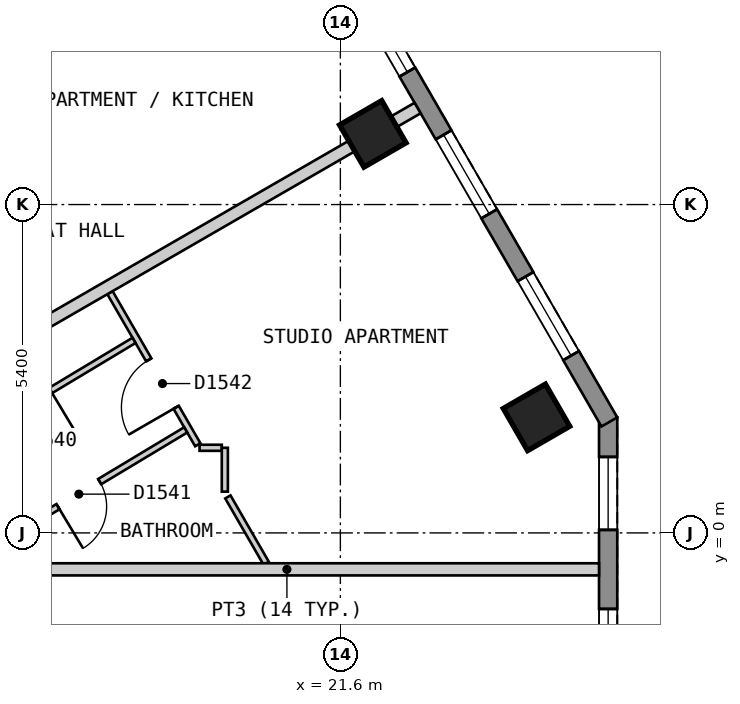
"""IFC4 building model, lengths in metres.
Left out: names, types, materials, properties, quantities, classifications, styles, units other than length and angle.
Written with IfcOpenShell. Run it as: python <this file> out.ifc"""

import sys

from ifc_helpers import new_model, si_unit, direction, frame, frame_2d, origin, origin_2d, place, context, subcontext, project, spatial, polyline, rectangle, outline, extrude, element, fill, save


model = new_model("IFC4")
c1 = context("Model", 3, precision=1e-05, world=origin(), true_north=direction((0.0, 1.0)))
c2 = subcontext(c1, "Body", "Model", "MODEL_VIEW")
j1 = project(units=[si_unit("LENGTHUNIT", "METRE"), si_unit("PLANEANGLEUNIT", "RADIAN")], contexts=[c1])
p1 = place(None, origin())
s1 = spatial("IfcSite", under=j1, at=p1, CompositionType="ELEMENT")
p2 = place(p1, origin())
s2 = spatial("IfcBuilding", under=s1, at=p2, CompositionType="ELEMENT")
p3 = place(p2, frame((0.0, 0.0, 196.2)))
s3 = spatial("IfcBuildingStorey", under=s2, at=p3, CompositionType="ELEMENT", Elevation=196.2)
for number, where, z_axis, x_axis in (
    (1, (24.826, 1.9, 0.0), (0.0, 0.0, 1.0), (-0.5, 0.866, 0.0)),
    (2, (22.134, 6.562, 0.0), (0.0, 0.0, 1.0), (-0.5, 0.866, 0.0)),
):
    element("IfcColumn", number, at=place(p3, frame(where, z_axis=z_axis, x_axis=x_axis)), inside=s3, PredefinedType="COLUMN", context=c2, shape_type="SweptSolid", body=[
        extrude(rectangle(XDim=0.8, YDim=0.8, at=origin_2d()), origin(), (0.0, 0.0, 1.0), 3.0),
    ])
p4 = place(p3, frame((26.004, -3.1, 0.0), z_axis=(0.0, 0.0, 1.0), x_axis=(0.0, 1.0, 0.0)))
e3 = element("IfcWall", 3, at=p4, inside=s3, PredefinedType="SOLIDWALL", context=c2, shape_type="SweptSolid", body=[
    extrude(outline(polyline([(0.0, -0.15), (5.0, -0.15), (4.92, 0.15), (0.08, 0.15), (0.0, -0.15)])), origin(), (0.0, 0.0, 1.0), 2.6),
])
p5 = place(p4, frame((0.65, 0.0, 0.15)))
e4 = element("IfcOpeningElement", 4, at=p5, cuts=e3, PredefinedType="OPENING", context=c2, shape_type="SweptSolid", body=[
    extrude(rectangle(XDim=1.2, YDim=2.1, at=frame_2d((0.6, 1.05))), frame((0.0, 0.16, 0.0), z_axis=(0.0, -1.0, 0.0), x_axis=(1.0, 0.0, 0.0)), (0.0, 0.0, 1.0), 0.32),
])
p6 = place(p4, frame((3.15, 0.0, 0.15)))
e5 = element("IfcOpeningElement", 5, at=p6, cuts=e3, PredefinedType="OPENING", context=c2, shape_type="SweptSolid", body=[
    extrude(rectangle(XDim=1.2, YDim=2.1, at=frame_2d((0.6, 1.05))), frame((0.0, 0.16, 0.0), z_axis=(0.0, -1.0, 0.0), x_axis=(1.0, 0.0, 0.0)), (0.0, 0.0, 1.0), 0.32),
])
p7 = place(p3, frame((26.024, 1.825, 0.0), z_axis=(0.0, 0.0, 1.0), x_axis=(-0.500010537973, 0.866019319597, 0.0)))
e6 = element("IfcWall", 6, at=p7, inside=s3, PredefinedType="SOLIDWALL", context=c2, shape_type="SweptSolid", body=[
    extrude(outline(polyline([(0.0, -0.15), (22.863, -0.15), (22.783, 0.15), (0.08, 0.15), (0.0, -0.15)])), origin(), (0.0, 0.0, 1.0), 2.6),
])
p8 = place(p7, frame((1.259, 0.0, 0.15)))
e7 = element("IfcOpeningElement", 7, at=p8, cuts=e6, PredefinedType="OPENING", context=c2, shape_type="SweptSolid", body=[
    extrude(rectangle(XDim=1.5, YDim=2.1, at=frame_2d((0.75, 1.05))), frame((0.0, 0.16, 0.0), z_axis=(0.0, -1.0, 0.0), x_axis=(1.0, 0.0, 0.0)), (0.0, 0.0, 1.0), 0.32),
])
p9 = place(p7, frame((3.952, 0.0, 0.15)))
e8 = element("IfcOpeningElement", 8, at=p9, cuts=e6, PredefinedType="OPENING", context=c2, shape_type="SweptSolid", body=[
    extrude(rectangle(XDim=1.5, YDim=2.1, at=frame_2d((0.75, 1.05))), frame((0.0, 0.16, 0.0), z_axis=(0.0, -1.0, 0.0), x_axis=(1.0, 0.0, 0.0)), (0.0, 0.0, 1.0), 0.32),
])
p10 = place(p7, frame((6.644, 0.0, 0.15)))
e9 = element("IfcOpeningElement", 9, at=p10, cuts=e6, PredefinedType="OPENING", context=c2, shape_type="SweptSolid", body=[
    extrude(rectangle(XDim=1.5, YDim=2.1, at=frame_2d((0.75, 1.05))), frame((0.0, 0.16, 0.0), z_axis=(0.0, -1.0, 0.0), x_axis=(1.0, 0.0, 0.0)), (0.0, 0.0, 1.0), 0.32),
])
p11 = place(p7, frame((9.335, 0.0, 0.15)))
e10 = element("IfcOpeningElement", 10, at=p11, cuts=e6, PredefinedType="OPENING", context=c2, shape_type="SweptSolid", body=[
    extrude(rectangle(XDim=1.5, YDim=2.1, at=frame_2d((0.75, 1.05))), frame((0.0, 0.16, 0.0), z_axis=(0.0, -1.0, 0.0), x_axis=(1.0, 0.0, 0.0)), (0.0, 0.0, 1.0), 0.32),
])
p12 = place(p7, frame((12.028, 0.0, 0.15)))
e11 = element("IfcOpeningElement", 11, at=p12, cuts=e6, PredefinedType="OPENING", context=c2, shape_type="SweptSolid", body=[
    extrude(rectangle(XDim=1.5, YDim=2.1, at=frame_2d((0.75, 1.05))), frame((0.0, 0.16, 0.0), z_axis=(0.0, -1.0, 0.0), x_axis=(1.0, 0.0, 0.0)), (0.0, 0.0, 1.0), 0.32),
])
p13 = place(p7, frame((14.72, 0.0, 0.15)))
e12 = element("IfcOpeningElement", 12, at=p13, cuts=e6, PredefinedType="OPENING", context=c2, shape_type="SweptSolid", body=[
    extrude(rectangle(XDim=1.5, YDim=2.1, at=frame_2d((0.75, 1.05))), frame((0.0, 0.16, 0.0), z_axis=(0.0, -1.0, 0.0), x_axis=(1.0, 0.0, 0.0)), (0.0, 0.0, 1.0), 0.32),
])
p14 = place(p7, frame((17.411, 0.0, 0.15)))
e13 = element("IfcOpeningElement", 13, at=p14, cuts=e6, PredefinedType="OPENING", context=c2, shape_type="SweptSolid", body=[
    extrude(rectangle(XDim=1.5, YDim=2.1, at=frame_2d((0.75, 1.05))), frame((0.0, 0.16, 0.0), z_axis=(0.0, -1.0, 0.0), x_axis=(1.0, 0.0, 0.0)), (0.0, 0.0, 1.0), 0.32),
])
p15 = place(p7, frame((20.104, 0.0, 0.15)))
e14 = element("IfcOpeningElement", 14, at=p15, cuts=e6, PredefinedType="OPENING", context=c2, shape_type="SweptSolid", body=[
    extrude(rectangle(XDim=1.5, YDim=2.1, at=frame_2d((0.75, 1.05))), frame((0.0, 0.16, 0.0), z_axis=(0.0, -1.0, 0.0), x_axis=(1.0, 0.0, 0.0)), (0.0, 0.0, 1.0), 0.32),
])
p16 = place(p3, frame((17.811, 3.951, 0.0), z_axis=(0.0, 0.0, 1.0), x_axis=(0.499976149225, -0.866039173598, 0.0)))
e15 = element("IfcWall", 15, at=p16, inside=s3, PredefinedType="PARTITIONING", context=c2, shape_type="SweptSolid", body=[
    extrude(rectangle(XDim=2.888, YDim=0.1, at=frame_2d((1.444, 0.0))), origin(), (0.0, 0.0, 1.0), 2.6),
])
p17 = place(p16, frame((1.276, 0.0, 0.0)))
e16 = element("IfcOpeningElement", 16, at=p17, cuts=e15, PredefinedType="OPENING", context=c2, shape_type="SweptSolid", body=[
    extrude(rectangle(XDim=0.9, YDim=2.1, at=frame_2d((0.45, 1.05))), frame((0.0, 0.06, 0.0), z_axis=(0.0, -1.0, 0.0), x_axis=(1.0, 0.0, 0.0)), (0.0, 0.0, 1.0), 0.12),
])
p18 = place(p3, frame((19.75, 0.592, 0.0), z_axis=(0.0, 0.0, 1.0), x_axis=(0.499974077718, -0.866040369504, 0.0)))
e17 = element("IfcWall", 17, at=p18, inside=s3, PredefinedType="PARTITIONING", context=c2, shape_type="SweptSolid", body=[
    extrude(rectangle(XDim=1.26, YDim=0.1, at=frame_2d((0.63, 0.0))), origin(), (0.0, 0.0, 1.0), 2.6),
])
p19 = place(p3, frame((19.284, 1.4, 0.0), z_axis=(0.0, 0.0, 1.0), x_axis=(1.0, 0.0, 0.0)))
e18 = element("IfcWall", 18, at=p19, inside=s3, PredefinedType="PARTITIONING", context=c2, shape_type="SweptSolid", body=[
    extrude(rectangle(XDim=0.366, YDim=0.1, at=frame_2d((0.183, 0.0))), origin(), (0.0, 0.0, 1.0), 2.6),
])
p20 = place(p3, frame((19.7, 0.679, 0.0), z_axis=(0.0, 0.0, 1.0), x_axis=(0.0, 1.0, 0.0)))
e19 = element("IfcWall", 19, at=p20, inside=s3, PredefinedType="PARTITIONING", context=c2, shape_type="SweptSolid", body=[
    extrude(rectangle(XDim=0.721, YDim=0.1, at=frame_2d((0.36, 0.0))), origin(), (0.0, 0.0, 1.0), 2.6),
])
p21 = place(p3, frame((14.734, 1.08, 0.0), z_axis=(0.0, 0.0, 1.0), x_axis=(0.857205608004, 0.514974315482, 0.0)))
e20 = element("IfcWall", 20, at=p21, inside=s3, PredefinedType="PARTITIONING", context=c2, shape_type="SweptSolid", body=[
    extrude(rectangle(XDim=4.051, YDim=0.1, at=frame_2d((2.025, 0.0))), origin(), (0.0, 0.0, 1.0), 2.6),
])
p22 = place(p21, frame((1.55, 0.0, 0.0)))
e21 = element("IfcOpeningElement", 21, at=p22, cuts=e20, PredefinedType="OPENING", context=c2, shape_type="SweptSolid", body=[
    extrude(rectangle(XDim=0.9, YDim=2.1, at=frame_2d((0.45, 1.05))), frame((0.0, 0.06, 0.0), z_axis=(0.0, -1.0, 0.0), x_axis=(1.0, 0.0, 0.0)), (0.0, 0.0, 1.0), 0.12),
])
p23 = place(p3, frame((15.499, -0.444, 0.0), z_axis=(0.0, 0.0, 1.0), x_axis=(0.857061798163, 0.515213619899, 0.0)))
e22 = element("IfcWall", 22, at=p23, inside=s3, PredefinedType="PARTITIONING", context=c2, shape_type="SweptSolid", body=[
    extrude(rectangle(XDim=4.15, YDim=0.1, at=frame_2d((2.075, 0.0))), origin(), (0.0, 0.0, 1.0), 2.6),
])
p24 = place(p23, frame((1.7, 0.0, 0.0)))
e23 = element("IfcOpeningElement", 23, at=p24, cuts=e22, PredefinedType="OPENING", context=c2, shape_type="SweptSolid", body=[
    extrude(rectangle(XDim=0.8, YDim=2.1, at=frame_2d((0.4, 1.05))), frame((0.0, 0.06, 0.0), z_axis=(0.0, -1.0, 0.0), x_axis=(1.0, 0.0, 0.0)), (0.0, 0.0, 1.0), 0.12),
])
p25 = place(p3, frame((15.588, -0.599, 0.0), z_axis=(0.0, 0.0, 1.0), x_axis=(1.0, 0.0, 0.0)))
e24 = element("IfcWall", 24, at=p25, inside=s3, PredefinedType="PARTITIONING", context=c2, shape_type="SweptSolid", body=[
    extrude(rectangle(XDim=10.266, YDim=0.2, at=frame_2d((5.133, 0.0))), origin(), (0.0, 0.0, 1.0), 2.6),
])
p26 = place(p3, frame((14.21, 1.987, 0.0), z_axis=(0.0, 0.0, 1.0), x_axis=(0.866022959057, 0.500004234368, 0.0)))
e25 = element("IfcWall", 25, at=p26, inside=s3, PredefinedType="PARTITIONING", context=c2, shape_type="SweptSolid", body=[
    extrude(rectangle(XDim=10.0, YDim=0.2, at=frame_2d((5.0, 0.0))), origin(), (0.0, 0.0, 1.0), 2.6),
])
p27 = place(p3, frame((11.518, 6.65, 0.0), z_axis=(0.0, 0.0, 1.0), x_axis=(0.866016855193, 0.500014806302, 0.0)))
e26 = element("IfcWall", 26, at=p27, inside=s3, PredefinedType="PARTITIONING", context=c2, shape_type="SweptSolid", body=[
    extrude(rectangle(XDim=10.0, YDim=0.2, at=frame_2d((5.0, 0.0))), origin(), (0.0, 0.0, 1.0), 2.6),
])
p28 = place(p5, origin())
e27 = element("IfcWindow", 27, at=p28, inside=s3, PartitioningType="SINGLE_PANEL", PredefinedType="WINDOW", context=c2, shape_type="SweptSolid", body=[
    extrude(rectangle(XDim=1.2, YDim=2.1, at=frame_2d((0.6, 1.05))), frame((0.0, 0.03, 0.0), z_axis=(0.0, -1.0, 0.0), x_axis=(1.0, 0.0, 0.0)), (0.0, 0.0, 1.0), 0.06),
])
fill(e4, e27)
p29 = place(p6, origin())
e28 = element("IfcWindow", 28, at=p29, inside=s3, PartitioningType="SINGLE_PANEL", PredefinedType="WINDOW", context=c2, shape_type="SweptSolid", body=[
    extrude(rectangle(XDim=1.2, YDim=2.1, at=frame_2d((0.6, 1.05))), frame((0.0, 0.03, 0.0), z_axis=(0.0, -1.0, 0.0), x_axis=(1.0, 0.0, 0.0)), (0.0, 0.0, 1.0), 0.06),
])
fill(e5, e28)
p30 = place(p8, origin())
e29 = element("IfcWindow", 29, at=p30, inside=s3, PartitioningType="SINGLE_PANEL", PredefinedType="WINDOW", context=c2, shape_type="SweptSolid", body=[
    extrude(rectangle(XDim=1.5, YDim=2.1, at=frame_2d((0.75, 1.05))), frame((0.0, 0.03, 0.0), z_axis=(0.0, -1.0, 0.0), x_axis=(1.0, 0.0, 0.0)), (0.0, 0.0, 1.0), 0.06),
])
fill(e7, e29)
p31 = place(p9, origin())
e30 = element("IfcWindow", 30, at=p31, inside=s3, PartitioningType="SINGLE_PANEL", PredefinedType="WINDOW", context=c2, shape_type="SweptSolid", body=[
    extrude(rectangle(XDim=1.5, YDim=2.1, at=frame_2d((0.75, 1.05))), frame((0.0, 0.03, 0.0), z_axis=(0.0, -1.0, 0.0), x_axis=(1.0, 0.0, 0.0)), (0.0, 0.0, 1.0), 0.06),
])
fill(e8, e30)
p32 = place(p10, origin())
e31 = element("IfcWindow", 31, at=p32, inside=s3, PartitioningType="SINGLE_PANEL", PredefinedType="WINDOW", context=c2, shape_type="SweptSolid", body=[
    extrude(rectangle(XDim=1.5, YDim=2.1, at=frame_2d((0.75, 1.05))), frame((0.0, 0.03, 0.0), z_axis=(0.0, -1.0, 0.0), x_axis=(1.0, 0.0, 0.0)), (0.0, 0.0, 1.0), 0.06),
])
fill(e9, e31)
p33 = place(p24, origin())
e32 = element("IfcDoor", 32, at=p33, inside=s3, OperationType="SINGLE_SWING_LEFT", PredefinedType="DOOR", context=c2, shape_type="SweptSolid", body=[
    extrude(rectangle(XDim=0.8, YDim=2.1, at=frame_2d((0.4, 1.05))), frame((0.0, 0.025, 0.0), z_axis=(0.0, -1.0, 0.0), x_axis=(1.0, 0.0, 0.0)), (0.0, 0.0, 1.0), 0.05),
])
fill(e23, e32)
p34 = place(p17, origin())
e33 = element("IfcDoor", 33, at=p34, inside=s3, OperationType="SINGLE_SWING_RIGHT", PredefinedType="DOOR", context=c2, shape_type="SweptSolid", body=[
    extrude(rectangle(XDim=0.9, YDim=2.1, at=frame_2d((0.45, 1.05))), frame((0.0, 0.025, 0.0), z_axis=(0.0, -1.0, 0.0), x_axis=(1.0, 0.0, 0.0)), (0.0, 0.0, 1.0), 0.05),
])
fill(e16, e33)
save(model, sys.argv[1])
